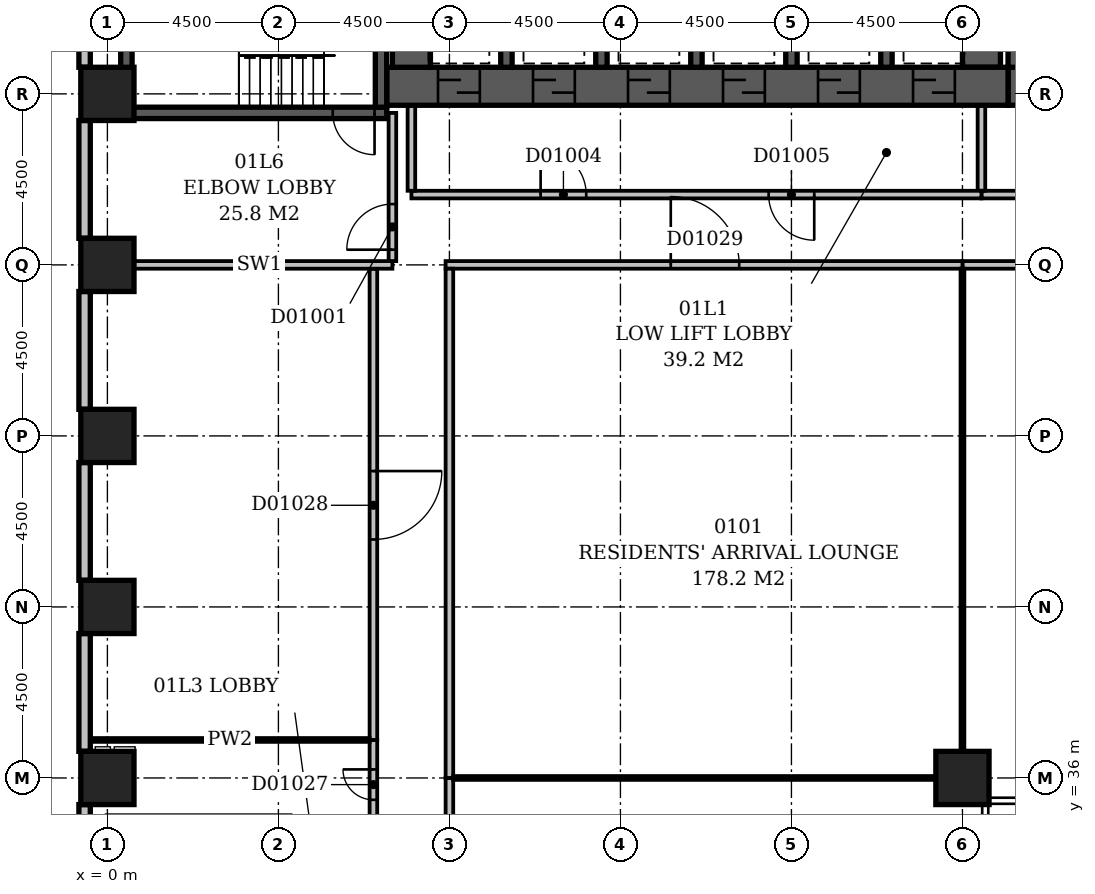
"""IFC4 building model, lengths in metres.
Left out: names, types, materials, properties, quantities, classifications, styles, units other than length and angle.
Written with IfcOpenShell. Run it as: python <this file> out.ifc"""

import sys

from ifc_helpers import new_model, si_unit, direction, frame, frame_2d, origin, origin_2d, place, context, subcontext, project, spatial, rectangle, extrude, element, fill, save


model = new_model("IFC4")
c1 = context("Model", 3, precision=1e-05, world=origin(), true_north=direction((0.0, 1.0)))
c2 = subcontext(c1, "Body", "Model", "MODEL_VIEW")
j1 = project(units=[si_unit("LENGTHUNIT", "METRE"), si_unit("PLANEANGLEUNIT", "RADIAN")], contexts=[c1])
p1 = place(None, origin())
s1 = spatial("IfcSite", under=j1, at=p1, CompositionType="ELEMENT")
p2 = place(p1, origin())
s2 = spatial("IfcBuilding", under=s1, at=p2, CompositionType="ELEMENT")
p3 = place(p2, frame((0.0, 0.0, 9.0)))
s3 = spatial("IfcBuildingStorey", under=s2, at=p3, CompositionType="ELEMENT", Elevation=9.0)
p4 = place(p3, frame((0.35, 53.5, -0.6), z_axis=(0.0, 0.0, 1.0), x_axis=(1.0, 0.0, 0.0)))
e1 = element("IfcWall", 1, at=p4, inside=s3, PredefinedType="SHEAR", context=c2, shape_type="SweptSolid", body=[
    extrude(rectangle(XDim=7.0, YDim=0.3, at=frame_2d((3.5, 0.0))), origin(), (0.0, 0.0, 1.0), 5.2),
])
p5 = place(p4, frame((5.58, 0.0, 0.6)))
e2 = element("IfcOpeningElement", 2, at=p5, cuts=e1, PredefinedType="OPENING", context=c2, shape_type="SweptSolid", body=[
    extrude(rectangle(XDim=1.1, YDim=2.1, at=frame_2d((0.55, 1.05))), frame((0.0, 0.162, 0.0), z_axis=(0.0, -1.0, 0.0), x_axis=(1.0, 0.0, 0.0)), (0.0, 0.0, 1.0), 0.324),
])
for number, where, z_axis, x_axis in (
    (3, (0.5, 53.65, -0.6), (0.0, 0.0, 1.0), (0.0, 1.0, 0.0)),
    (4, (7.2, 53.65, -0.6), (0.0, 0.0, 1.0), (0.0, 1.0, 0.0)),
):
    element("IfcWall", number, at=place(p3, frame(where, z_axis=z_axis, x_axis=x_axis)), inside=s3, PredefinedType="SHEAR", context=c2, shape_type="SweptSolid", body=[
        extrude(rectangle(XDim=4.2, YDim=0.3, at=frame_2d((2.1, 0.0))), origin(), (0.0, 0.0, 1.0), 5.2),
    ])
p6 = place(p3, frame((7.35, 54.2, -0.6), z_axis=(0.0, 0.0, 1.0), x_axis=(1.0, 0.0, 0.0)))
e5 = element("IfcWall", 5, at=p6, inside=s3, PredefinedType="SHEAR", context=c2, shape_type="SweptSolid", body=[
    extrude(rectangle(XDim=16.35, YDim=1.0, at=frame_2d((8.175, 0.0))), origin(), (0.0, 0.0, 1.0), 5.2),
])
p7 = place(p6, frame((1.35, 0.0, 0.6)))
e6 = element("IfcOpeningElement", 6, at=p7, cuts=e5, PredefinedType="OPENING", context=c2, shape_type="SweptSolid", body=[
    extrude(rectangle(XDim=1.1, YDim=2.1, at=frame_2d((0.55, 1.05))), frame((0.0, 0.512, 0.0), z_axis=(0.0, -1.0, 0.0), x_axis=(1.0, 0.0, 0.0)), (0.0, 0.0, 1.0), 1.024),
])
p8 = place(p6, frame((3.85, 0.0, 0.6)))
e7 = element("IfcOpeningElement", 7, at=p8, cuts=e5, PredefinedType="OPENING", context=c2, shape_type="SweptSolid", body=[
    extrude(rectangle(XDim=1.1, YDim=2.1, at=frame_2d((0.55, 1.05))), frame((0.0, 0.512, 0.0), z_axis=(0.0, -1.0, 0.0), x_axis=(1.0, 0.0, 0.0)), (0.0, 0.0, 1.0), 1.024),
])
p9 = place(p6, frame((6.35, 0.0, 0.6)))
e8 = element("IfcOpeningElement", 8, at=p9, cuts=e5, PredefinedType="OPENING", context=c2, shape_type="SweptSolid", body=[
    extrude(rectangle(XDim=1.1, YDim=2.1, at=frame_2d((0.55, 1.05))), frame((0.0, 0.512, 0.0), z_axis=(0.0, -1.0, 0.0), x_axis=(1.0, 0.0, 0.0)), (0.0, 0.0, 1.0), 1.024),
])
p10 = place(p6, frame((8.85, 0.0, 0.6)))
e9 = element("IfcOpeningElement", 9, at=p10, cuts=e5, PredefinedType="OPENING", context=c2, shape_type="SweptSolid", body=[
    extrude(rectangle(XDim=1.1, YDim=2.1, at=frame_2d((0.55, 1.05))), frame((0.0, 0.512, 0.0), z_axis=(0.0, -1.0, 0.0), x_axis=(1.0, 0.0, 0.0)), (0.0, 0.0, 1.0), 1.024),
])
p11 = place(p6, frame((11.35, 0.0, 0.6)))
e10 = element("IfcOpeningElement", 10, at=p11, cuts=e5, PredefinedType="OPENING", context=c2, shape_type="SweptSolid", body=[
    extrude(rectangle(XDim=1.1, YDim=2.1, at=frame_2d((0.55, 1.05))), frame((0.0, 0.512, 0.0), z_axis=(0.0, -1.0, 0.0), x_axis=(1.0, 0.0, 0.0)), (0.0, 0.0, 1.0), 1.024),
])
p12 = place(p6, frame((13.85, 0.0, 0.6)))
e11 = element("IfcOpeningElement", 11, at=p12, cuts=e5, PredefinedType="OPENING", context=c2, shape_type="SweptSolid", body=[
    extrude(rectangle(XDim=1.1, YDim=2.1, at=frame_2d((0.55, 1.05))), frame((0.0, 0.512, 0.0), z_axis=(0.0, -1.0, 0.0), x_axis=(1.0, 0.0, 0.0)), (0.0, 0.0, 1.0), 1.024),
])
p13 = place(p3, frame((8.0, 54.7, -0.6), z_axis=(0.0, 0.0, 1.0), x_axis=(0.0, 1.0, 0.0)))
e12 = element("IfcWall", 12, at=p13, inside=s3, PredefinedType="SHEAR", context=c2, shape_type="SweptSolid", body=[
    extrude(rectangle(XDim=2.8, YDim=1.0, at=frame_2d((1.4, 0.0))), origin(), (0.0, 0.0, 1.0), 5.2),
])
for number, where, z_axis, x_axis in (
    (13, (10.5, 54.7, -0.6), (0.0, 0.0, 1.0), (0.0, 1.0, 0.0)),
    (14, (13.0, 54.7, -0.6), (0.0, 0.0, 1.0), (0.0, 1.0, 0.0)),
    (15, (15.5, 54.7, -0.6), (0.0, 0.0, 1.0), (0.0, 1.0, 0.0)),
    (16, (18.0, 54.7, -0.6), (0.0, 0.0, 1.0), (0.0, 1.0, 0.0)),
    (17, (20.5, 54.7, -0.6), (0.0, 0.0, 1.0), (0.0, 1.0, 0.0)),
):
    element("IfcWall", number, at=place(p3, frame(where, z_axis=z_axis, x_axis=x_axis)), inside=s3, PredefinedType="SHEAR", context=c2, shape_type="SweptSolid", body=[
        extrude(rectangle(XDim=2.8, YDim=0.3, at=frame_2d((1.4, 0.0))), origin(), (0.0, 0.0, 1.0), 5.2),
    ])
p14 = place(p3, frame((23.0, 54.7, -0.6), z_axis=(0.0, 0.0, 1.0), x_axis=(0.0, 1.0, 0.0)))
e18 = element("IfcWall", 18, at=p14, inside=s3, PredefinedType="SHEAR", context=c2, shape_type="SweptSolid", body=[
    extrude(rectangle(XDim=2.8, YDim=1.0, at=frame_2d((1.4, 0.0))), origin(), (0.0, 0.0, 1.0), 5.2),
])
p15 = place(p3, frame((23.7, 54.2, -0.6), z_axis=(0.0, 0.0, 1.0), x_axis=(1.0, 0.0, 0.0)))
e19 = element("IfcWall", 19, at=p15, inside=s3, PredefinedType="SHEAR", context=c2, shape_type="SweptSolid", body=[
    extrude(rectangle(XDim=3.5, YDim=1.0, at=frame_2d((1.75, 0.0))), origin(), (0.0, 0.0, 1.0), 5.2),
])
p16 = place(p15, frame((1.2, 0.0, 0.6)))
e20 = element("IfcOpeningElement", 20, at=p16, cuts=e19, PredefinedType="OPENING", context=c2, shape_type="SweptSolid", body=[
    extrude(rectangle(XDim=1.1, YDim=2.1, at=frame_2d((0.55, 1.05))), frame((0.0, 0.512, 0.0), z_axis=(0.0, -1.0, 0.0), x_axis=(1.0, 0.0, 0.0)), (0.0, 0.0, 1.0), 1.024),
])
p17 = place(p3, frame((24.2, 54.7, -0.6), z_axis=(0.0, 0.0, 1.0), x_axis=(0.0, 1.0, 0.0)))
e21 = element("IfcWall", 21, at=p17, inside=s3, PredefinedType="SHEAR", context=c2, shape_type="SweptSolid", body=[
    extrude(rectangle(XDim=2.8, YDim=1.0, at=frame_2d((1.4, 0.0))), origin(), (0.0, 0.0, 1.0), 5.2),
])
for number, where, z_axis, x_axis in (
    (22, (0.0, 36.0, -0.6), (0.0, 0.0, 1.0), (1.0, 0.0, 0.0)),
    (23, (22.5, 36.0, -0.6), (0.0, 0.0, 1.0), (1.0, 0.0, 0.0)),
    (24, (0.0, 40.5, -0.6), (0.0, 0.0, 1.0), (1.0, 0.0, 0.0)),
    (25, (0.0, 45.0, -0.6), (0.0, 0.0, 1.0), (1.0, 0.0, 0.0)),
    (26, (0.0, 49.5, -0.6), (0.0, 0.0, 1.0), (1.0, 0.0, 0.0)),
    (27, (0.0, 54.0, -0.6), (0.0, 0.0, 1.0), (1.0, 0.0, 0.0)),
):
    element("IfcColumn", number, at=place(p3, frame(where, z_axis=z_axis, x_axis=x_axis)), inside=s3, PredefinedType="COLUMN", context=c2, shape_type="SweptSolid", body=[
        extrude(rectangle(XDim=1.4, YDim=1.4, at=origin_2d()), origin(), (0.0, 0.0, 1.0), 5.2),
    ])
for number, where, z_axis, x_axis in (
    (28, (-0.6, 57.8, 0.0), (0.0, 0.0, 1.0), (0.0, -1.0, 0.0)),
    (29, (-0.6, 53.3, 0.0), (0.0, 0.0, 1.0), (0.0, -1.0, 0.0)),
    (30, (-0.6, 48.8, 0.0), (0.0, 0.0, 1.0), (0.0, -1.0, 0.0)),
    (31, (-0.6, 44.3, 0.0), (0.0, 0.0, 1.0), (0.0, -1.0, 0.0)),
    (32, (-0.6, 39.8, 0.0), (0.0, 0.0, 1.0), (0.0, -1.0, 0.0)),
    (33, (-0.6, 35.3, 0.0), (0.0, 0.0, 1.0), (0.0, -1.0, 0.0)),
):
    element("IfcWall", number, at=place(p3, frame(where, z_axis=z_axis, x_axis=x_axis)), inside=s3, PredefinedType="STANDARD", context=c2, shape_type="SweptSolid", body=[
        extrude(rectangle(XDim=3.1, YDim=0.3, at=frame_2d((1.55, 0.0))), origin(), (0.0, 0.0, 1.0), 3.9),
    ])
p18 = place(p3, frame((8.0, 51.35, 0.0), z_axis=(0.0, 0.0, 1.0), x_axis=(1.0, 0.0, 0.0)))
e34 = element("IfcWall", 34, at=p18, inside=s3, PredefinedType="PARTITIONING", context=c2, shape_type="SweptSolid", body=[
    extrude(rectangle(XDim=15.0, YDim=0.2, at=frame_2d((7.5, 0.0))), origin(), (0.0, 0.0, 1.0), 4.6),
])
p19 = place(p18, frame((3.4, 0.0, 0.0)))
e35 = element("IfcOpeningElement", 35, at=p19, cuts=e34, PredefinedType="OPENING", context=c2, shape_type="SweptSolid", body=[
    extrude(rectangle(XDim=1.2, YDim=2.1, at=frame_2d((0.6, 1.05))), frame((0.0, 0.112, 0.0), z_axis=(0.0, -1.0, 0.0), x_axis=(1.0, 0.0, 0.0)), (0.0, 0.0, 1.0), 0.224),
])
p20 = place(p18, frame((9.4, 0.0, 0.0)))
e36 = element("IfcOpeningElement", 36, at=p20, cuts=e34, PredefinedType="OPENING", context=c2, shape_type="SweptSolid", body=[
    extrude(rectangle(XDim=1.2, YDim=2.1, at=frame_2d((0.6, 1.05))), frame((0.0, 0.112, 0.0), z_axis=(0.0, -1.0, 0.0), x_axis=(1.0, 0.0, 0.0)), (0.0, 0.0, 1.0), 0.224),
])
for number, where, z_axis, x_axis in (
    (37, (23.0, 51.45, 0.0), (0.0, 0.0, 1.0), (0.0, 1.0, 0.0)),
    (38, (8.0, 51.45, 0.0), (0.0, 0.0, 1.0), (0.0, 1.0, 0.0)),
):
    element("IfcWall", number, at=place(p3, frame(where, z_axis=z_axis, x_axis=x_axis)), inside=s3, PredefinedType="PARTITIONING", context=c2, shape_type="SweptSolid", body=[
        extrude(rectangle(XDim=2.23, YDim=0.2, at=frame_2d((1.115, 0.0))), origin(), (0.0, 0.0, 1.0), 4.6),
    ])
p21 = place(p3, frame((23.0, 51.35, 0.0), z_axis=(0.0, 0.0, 1.0), x_axis=(1.0, 0.0, 0.0)))
e39 = element("IfcWall", 39, at=p21, inside=s3, PredefinedType="PARTITIONING", context=c2, shape_type="SweptSolid", body=[
    extrude(rectangle(XDim=4.8, YDim=0.2, at=frame_2d((2.4, 0.0))), origin(), (0.0, 0.0, 1.0), 4.6),
])
p22 = place(p21, frame((1.65, 0.0, 0.0)))
e40 = element("IfcOpeningElement", 40, at=p22, cuts=e39, PredefinedType="OPENING", context=c2, shape_type="SweptSolid", body=[
    extrude(rectangle(XDim=1.2, YDim=2.1, at=frame_2d((0.6, 1.05))), frame((0.0, 0.112, 0.0), z_axis=(0.0, -1.0, 0.0), x_axis=(1.0, 0.0, 0.0)), (0.0, 0.0, 1.0), 0.224),
])
p23 = place(p3, frame((0.5, 49.5, 0.0), z_axis=(0.0, 0.0, 1.0), x_axis=(1.0, 0.0, 0.0)))
e41 = element("IfcWall", 41, at=p23, inside=s3, PredefinedType="PARTITIONING", context=c2, shape_type="SweptSolid", body=[
    extrude(rectangle(XDim=7.0, YDim=0.2, at=frame_2d((3.5, 0.0))), origin(), (0.0, 0.0, 1.0), 4.6),
])
p24 = place(p3, frame((7.5, 49.6, 0.0), z_axis=(0.0, 0.0, 1.0), x_axis=(0.0, 1.0, 0.0)))
e42 = element("IfcWall", 42, at=p24, inside=s3, PredefinedType="PARTITIONING", context=c2, shape_type="SweptSolid", body=[
    extrude(rectangle(XDim=3.9, YDim=0.2, at=frame_2d((1.95, 0.0))), origin(), (0.0, 0.0, 1.0), 4.6),
])
p25 = place(p24, frame((0.3, 0.0, 0.0)))
e43 = element("IfcOpeningElement", 43, at=p25, cuts=e42, PredefinedType="OPENING", context=c2, shape_type="SweptSolid", body=[
    extrude(rectangle(XDim=1.2, YDim=2.1, at=frame_2d((0.6, 1.05))), frame((0.0, 0.112, 0.0), z_axis=(0.0, -1.0, 0.0), x_axis=(1.0, 0.0, 0.0)), (0.0, 0.0, 1.0), 0.224),
])
p26 = place(p3, frame((9.0, 27.0, 0.0), z_axis=(0.0, 0.0, 1.0), x_axis=(0.0, 1.0, 0.0)))
e44 = element("IfcWall", 44, at=p26, inside=s3, PredefinedType="PARTITIONING", context=c2, shape_type="SweptSolid", body=[
    extrude(rectangle(XDim=9.0, YDim=0.2, at=frame_2d((4.5, 0.0))), origin(), (0.0, 0.0, 1.0), 4.6),
])
p27 = place(p26, frame((3.575, 0.0, 0.0)))
e45 = element("IfcOpeningElement", 45, at=p27, cuts=e44, PredefinedType="OPENING", context=c2, shape_type="SweptSolid", body=[
    extrude(rectangle(XDim=1.8, YDim=2.4, at=frame_2d((0.9, 1.2))), frame((0.0, 0.112, 0.0), z_axis=(0.0, -1.0, 0.0), x_axis=(1.0, 0.0, 0.0)), (0.0, 0.0, 1.0), 0.224),
])
p28 = place(p3, frame((22.5, 35.35, 0.0), z_axis=(0.0, 0.0, 1.0), x_axis=(0.0, 1.0, 0.0)))
e46 = element("IfcWall", 46, at=p28, inside=s3, PredefinedType="PARTITIONING", context=c2, shape_type="SweptSolid", body=[
    extrude(rectangle(XDim=0.6, YDim=0.1, at=frame_2d((0.3, 0.0))), origin(), (0.0, 0.0, 1.0), 3.9),
])
p29 = place(p3, frame((9.0, 36.0, 0.0), z_axis=(0.0, 0.0, 1.0), x_axis=(0.0, 1.0, 0.0)))
e47 = element("IfcWall", 47, at=p29, inside=s3, PredefinedType="PARTITIONING", context=c2, shape_type="SweptSolid", body=[
    extrude(rectangle(XDim=13.4, YDim=0.2, at=frame_2d((6.7, 0.0))), origin(), (0.0, 0.0, 1.0), 4.6),
])
p30 = place(p3, frame((22.45, 36.0, 0.0), z_axis=(0.0, 0.0, 1.0), x_axis=(-1.0, 0.0, 0.0)))
e48 = element("IfcWall", 48, at=p30, inside=s3, PredefinedType="PARTITIONING", context=c2, shape_type="SweptSolid", body=[
    extrude(rectangle(XDim=13.35, YDim=0.1, at=frame_2d((6.675, 0.0))), origin(), (0.0, 0.0, 1.0), 3.7),
])
p31 = place(p3, frame((-0.45, 37.0, 0.0), z_axis=(0.0, 0.0, 1.0), x_axis=(1.0, 0.0, 0.0)))
e49 = element("IfcWall", 49, at=p31, inside=s3, PredefinedType="PARTITIONING", context=c2, shape_type="SweptSolid", body=[
    extrude(rectangle(XDim=7.35, YDim=0.1, at=frame_2d((3.675, 0.0))), origin(), (0.0, 0.0, 1.0), 4.6),
])
p32 = place(p3, frame((7.0, 37.0, 0.0), z_axis=(0.0, 0.0, 1.0), x_axis=(0.0, -1.0, 0.0)))
e50 = element("IfcWall", 50, at=p32, inside=s3, PredefinedType="PARTITIONING", context=c2, shape_type="SweptSolid", body=[
    extrude(rectangle(XDim=2.4, YDim=0.2, at=frame_2d((1.2, 0.0))), origin(), (0.0, 0.0, 1.0), 4.6),
])
p33 = place(p32, frame((0.775, 0.0, 0.0)))
e51 = element("IfcOpeningElement", 51, at=p33, cuts=e50, PredefinedType="OPENING", context=c2, shape_type="SweptSolid", body=[
    extrude(rectangle(XDim=0.8, YDim=2.1, at=frame_2d((0.4, 1.05))), frame((0.0, 0.112, 0.0), z_axis=(0.0, -1.0, 0.0), x_axis=(1.0, 0.0, 0.0)), (0.0, 0.0, 1.0), 0.224),
])
p34 = place(p3, frame((7.0, 49.4, 0.0), z_axis=(0.0, 0.0, 1.0), x_axis=(0.0, -1.0, 0.0)))
e52 = element("IfcWall", 52, at=p34, inside=s3, PredefinedType="PARTITIONING", context=c2, shape_type="SweptSolid", body=[
    extrude(rectangle(XDim=12.4, YDim=0.2, at=frame_2d((6.2, 0.0))), origin(), (0.0, 0.0, 1.0), 4.6),
])
p35 = place(p34, frame((5.325, 0.0, 0.0)))
e53 = element("IfcOpeningElement", 53, at=p35, cuts=e52, PredefinedType="OPENING", context=c2, shape_type="SweptSolid", body=[
    extrude(rectangle(XDim=1.8, YDim=2.4, at=frame_2d((0.9, 1.2))), frame((0.0, 0.112, 0.0), z_axis=(0.0, -1.0, 0.0), x_axis=(1.0, 0.0, 0.0)), (0.0, 0.0, 1.0), 0.224),
])
p36 = place(p3, frame((8.9, 49.5, 0.0), z_axis=(0.0, 0.0, 1.0), x_axis=(1.0, 0.0, 0.0)))
e54 = element("IfcWall", 54, at=p36, inside=s3, PredefinedType="PARTITIONING", context=c2, shape_type="SweptSolid", body=[
    extrude(rectangle(XDim=13.6, YDim=0.2, at=frame_2d((6.8, 0.0))), origin(), (0.0, 0.0, 1.0), 4.6),
])
p37 = place(p36, frame((5.925, 0.0, 0.0)))
e55 = element("IfcOpeningElement", 55, at=p37, cuts=e54, PredefinedType="OPENING", context=c2, shape_type="SweptSolid", body=[
    extrude(rectangle(XDim=1.8, YDim=2.4, at=frame_2d((0.9, 1.2))), frame((0.0, 0.112, 0.0), z_axis=(0.0, -1.0, 0.0), x_axis=(1.0, 0.0, 0.0)), (0.0, 0.0, 1.0), 0.224),
])
p38 = place(p3, frame((22.5, 49.4, 0.0), z_axis=(0.0, 0.0, 1.0), x_axis=(0.0, -1.0, 0.0)))
e56 = element("IfcWall", 56, at=p38, inside=s3, PredefinedType="PARTITIONING", context=c2, shape_type="SweptSolid", body=[
    extrude(rectangle(XDim=13.45, YDim=0.1, at=frame_2d((6.725, 0.0))), origin(), (0.0, 0.0, 1.0), 4.6),
])
p39 = place(p3, frame((22.5, 49.5, 0.0), z_axis=(0.0, 0.0, 1.0), x_axis=(1.0, 0.0, 0.0)))
e57 = element("IfcWall", 57, at=p39, inside=s3, PredefinedType="PARTITIONING", context=c2, shape_type="SweptSolid", body=[
    extrude(rectangle(XDim=22.5, YDim=0.2, at=frame_2d((11.25, 0.0))), origin(), (0.0, 0.0, 1.0), 4.6),
])
p40 = place(p39, frame((10.35, 0.0, 0.0)))
e58 = element("IfcOpeningElement", 58, at=p40, cuts=e57, PredefinedType="OPENING", context=c2, shape_type="SweptSolid", body=[
    extrude(rectangle(XDim=1.8, YDim=2.4, at=frame_2d((0.9, 1.2))), frame((0.0, 0.112, 0.0), z_axis=(0.0, -1.0, 0.0), x_axis=(1.0, 0.0, 0.0)), (0.0, 0.0, 1.0), 0.224),
])
p41 = place(p25, origin())
e59 = element("IfcDoor", 59, at=p41, inside=s3, OperationType="SINGLE_SWING_LEFT", PredefinedType="DOOR", context=c2, shape_type="SweptSolid", body=[
    extrude(rectangle(XDim=1.2, YDim=2.1, at=frame_2d((0.6, 1.05))), frame((0.0, 0.025, 0.0), z_axis=(0.0, -1.0, 0.0), x_axis=(1.0, 0.0, 0.0)), (0.0, 0.0, 1.0), 0.05),
])
fill(e43, e59)
p42 = place(p7, origin())
e60 = element("IfcDoor", 60, at=p42, inside=s3, OperationType="SLIDING_TO_LEFT", PredefinedType="DOOR", context=c2, shape_type="SweptSolid", body=[
    extrude(rectangle(XDim=1.1, YDim=2.1, at=frame_2d((0.55, 1.05))), frame((0.0, 0.025, 0.0), z_axis=(0.0, -1.0, 0.0), x_axis=(1.0, 0.0, 0.0)), (0.0, 0.0, 1.0), 0.05),
])
fill(e6, e60)
p43 = place(p8, origin())
e61 = element("IfcDoor", 61, at=p43, inside=s3, OperationType="SLIDING_TO_LEFT", PredefinedType="DOOR", context=c2, shape_type="SweptSolid", body=[
    extrude(rectangle(XDim=1.1, YDim=2.1, at=frame_2d((0.55, 1.05))), frame((0.0, 0.025, 0.0), z_axis=(0.0, -1.0, 0.0), x_axis=(1.0, 0.0, 0.0)), (0.0, 0.0, 1.0), 0.05),
])
fill(e7, e61)
p44 = place(p9, origin())
e62 = element("IfcDoor", 62, at=p44, inside=s3, OperationType="SLIDING_TO_LEFT", PredefinedType="DOOR", context=c2, shape_type="SweptSolid", body=[
    extrude(rectangle(XDim=1.1, YDim=2.1, at=frame_2d((0.55, 1.05))), frame((0.0, 0.025, 0.0), z_axis=(0.0, -1.0, 0.0), x_axis=(1.0, 0.0, 0.0)), (0.0, 0.0, 1.0), 0.05),
])
fill(e8, e62)
p45 = place(p10, origin())
e63 = element("IfcDoor", 63, at=p45, inside=s3, OperationType="SLIDING_TO_LEFT", PredefinedType="DOOR", context=c2, shape_type="SweptSolid", body=[
    extrude(rectangle(XDim=1.1, YDim=2.1, at=frame_2d((0.55, 1.05))), frame((0.0, 0.025, 0.0), z_axis=(0.0, -1.0, 0.0), x_axis=(1.0, 0.0, 0.0)), (0.0, 0.0, 1.0), 0.05),
])
fill(e9, e63)
p46 = place(p11, origin())
e64 = element("IfcDoor", 64, at=p46, inside=s3, OperationType="SLIDING_TO_LEFT", PredefinedType="DOOR", context=c2, shape_type="SweptSolid", body=[
    extrude(rectangle(XDim=1.1, YDim=2.1, at=frame_2d((0.55, 1.05))), frame((0.0, 0.025, 0.0), z_axis=(0.0, -1.0, 0.0), x_axis=(1.0, 0.0, 0.0)), (0.0, 0.0, 1.0), 0.05),
])
fill(e10, e64)
p47 = place(p12, origin())
e65 = element("IfcDoor", 65, at=p47, inside=s3, OperationType="SLIDING_TO_LEFT", PredefinedType="DOOR", context=c2, shape_type="SweptSolid", body=[
    extrude(rectangle(XDim=1.1, YDim=2.1, at=frame_2d((0.55, 1.05))), frame((0.0, 0.025, 0.0), z_axis=(0.0, -1.0, 0.0), x_axis=(1.0, 0.0, 0.0)), (0.0, 0.0, 1.0), 0.05),
])
fill(e11, e65)
p48 = place(p19, origin())
e66 = element("IfcDoor", 66, at=p48, inside=s3, OperationType="SINGLE_SWING_LEFT", PredefinedType="DOOR", context=c2, shape_type="SweptSolid", body=[
    extrude(rectangle(XDim=1.2, YDim=2.1, at=frame_2d((0.6, 1.05))), frame((0.0, 0.025, 0.0), z_axis=(0.0, -1.0, 0.0), x_axis=(1.0, 0.0, 0.0)), (0.0, 0.0, 1.0), 0.05),
])
fill(e35, e66)
p49 = place(p20, origin())
e67 = element("IfcDoor", 67, at=p49, inside=s3, OperationType="SINGLE_SWING_RIGHT", PredefinedType="DOOR", context=c2, shape_type="SweptSolid", body=[
    extrude(rectangle(XDim=1.2, YDim=2.1, at=frame_2d((0.6, 1.05))), frame((0.0, 0.025, 0.0), z_axis=(0.0, -1.0, 0.0), x_axis=(1.0, 0.0, 0.0)), (0.0, 0.0, 1.0), 0.05),
])
fill(e36, e67)
p50 = place(p5, origin())
e68 = element("IfcDoor", 68, at=p50, inside=s3, OperationType="SINGLE_SWING_RIGHT", PredefinedType="DOOR", context=c2, shape_type="SweptSolid", body=[
    extrude(rectangle(XDim=1.1, YDim=2.1, at=frame_2d((0.55, 1.05))), frame((0.0, 0.025, 0.0), z_axis=(0.0, -1.0, 0.0), x_axis=(1.0, 0.0, 0.0)), (0.0, 0.0, 1.0), 0.05),
])
fill(e2, e68)
p51 = place(p33, frame((0.8, 0.0, 0.0), z_axis=(0.0, 0.0, 1.0), x_axis=(-1.0, 0.0, 0.0)))
e69 = element("IfcDoor", 69, at=p51, inside=s3, OperationType="SINGLE_SWING_RIGHT", PredefinedType="DOOR", context=c2, shape_type="SweptSolid", body=[
    extrude(rectangle(XDim=0.8, YDim=2.1, at=frame_2d((0.4, 1.05))), frame((0.0, 0.025, 0.0), z_axis=(0.0, -1.0, 0.0), x_axis=(1.0, 0.0, 0.0)), (0.0, 0.0, 1.0), 0.05),
])
fill(e51, e69)
p52 = place(p35, origin())
e70 = element("IfcDoor", 70, at=p52, inside=s3, OperationType="DOUBLE_DOOR_SINGLE_SWING", PredefinedType="DOOR", context=c2, shape_type="SweptSolid", body=[
    extrude(rectangle(XDim=1.8, YDim=2.4, at=frame_2d((0.9, 1.2))), frame((0.0, 0.025, 0.0), z_axis=(0.0, -1.0, 0.0), x_axis=(1.0, 0.0, 0.0)), (0.0, 0.0, 1.0), 0.05),
])
fill(e53, e70)
p53 = place(p37, origin())
e71 = element("IfcDoor", 71, at=p53, inside=s3, OperationType="DOUBLE_DOOR_SINGLE_SWING", PredefinedType="DOOR", context=c2, shape_type="SweptSolid", body=[
    extrude(rectangle(XDim=1.8, YDim=2.4, at=frame_2d((0.9, 1.2))), frame((0.0, 0.025, 0.0), z_axis=(0.0, -1.0, 0.0), x_axis=(1.0, 0.0, 0.0)), (0.0, 0.0, 1.0), 0.05),
])
fill(e55, e71)
save(model, sys.argv[1])
